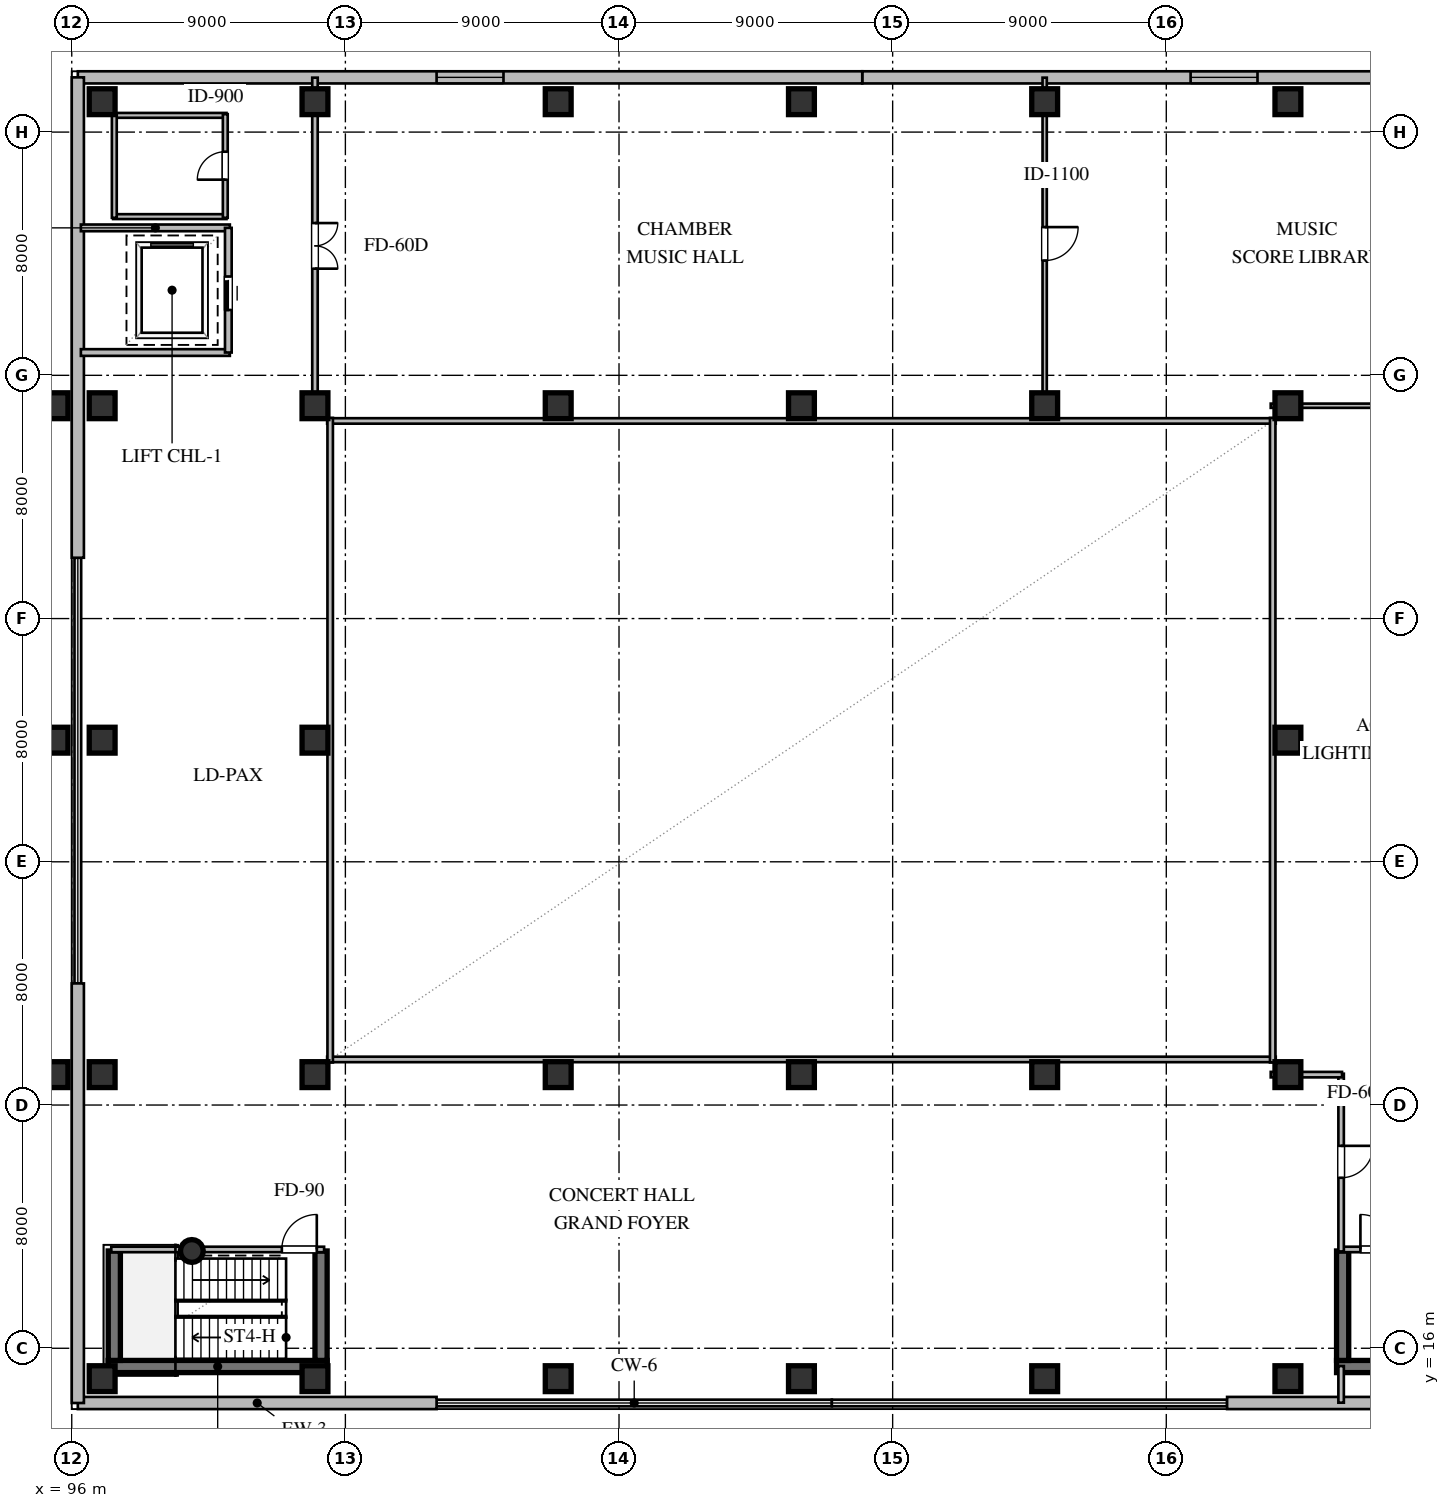
"""IFC4 building model, lengths in metres.
Left out: names, types, materials, properties, quantities, classifications, styles, units other than length and angle.
Written with IfcOpenShell. Run it as: python <this file> out.ifc"""

import sys

from ifc_helpers import new_model, si_unit, direction, frame, frame_2d, origin, origin_2d, place, context, subcontext, project, spatial, rectangle, circle, extrude, element, fill, save


model = new_model("IFC4")
c1 = context("Model", 3, precision=1e-05, world=origin(), true_north=direction((0.0, 1.0)))
c2 = subcontext(c1, "Body", "Model", "MODEL_VIEW")
j1 = project(units=[si_unit("LENGTHUNIT", "METRE"), si_unit("PLANEANGLEUNIT", "RADIAN")], contexts=[c1])
p1 = place(None, origin())
s1 = spatial("IfcSite", under=j1, at=p1, CompositionType="ELEMENT")
p2 = place(p1, origin())
s2 = spatial("IfcBuilding", under=s1, at=p2, CompositionType="ELEMENT")
p3 = place(p2, frame((0.0, 0.0, 9.6)))
s3 = spatial("IfcBuildingStorey", under=s2, at=p3, CompositionType="ELEMENT", Elevation=9.6)
for number, where, z_axis, x_axis in (
    (1, (97.0, 15.0, 0.0), (0.0, 0.0, 1.0), (1.0, 0.0, 0.0)),
    (2, (97.0, 25.0, 0.0), (0.0, 0.0, 1.0), (1.0, 0.0, 0.0)),
    (3, (97.0, 36.0, 0.0), (0.0, 0.0, 1.0), (1.0, 0.0, 0.0)),
    (4, (97.0, 47.0, 0.0), (0.0, 0.0, 1.0), (1.0, 0.0, 0.0)),
    (5, (97.0, 57.0, 0.0), (0.0, 0.0, 1.0), (1.0, 0.0, 0.0)),
    (6, (104.0, 15.0, 0.0), (0.0, 0.0, 1.0), (1.0, 0.0, 0.0)),
    (7, (104.0, 25.0, 0.0), (0.0, 0.0, 1.0), (1.0, 0.0, 0.0)),
    (8, (104.0, 36.0, 0.0), (0.0, 0.0, 1.0), (1.0, 0.0, 0.0)),
    (9, (104.0, 47.0, 0.0), (0.0, 0.0, 1.0), (1.0, 0.0, 0.0)),
    (10, (104.0, 57.0, 0.0), (0.0, 0.0, 1.0), (1.0, 0.0, 0.0)),
    (11, (112.0, 15.0, 0.0), (0.0, 0.0, 1.0), (1.0, 0.0, 0.0)),
    (12, (112.0, 25.0, 0.0), (0.0, 0.0, 1.0), (1.0, 0.0, 0.0)),
    (13, (112.0, 47.0, 0.0), (0.0, 0.0, 1.0), (1.0, 0.0, 0.0)),
    (14, (112.0, 57.0, 0.0), (0.0, 0.0, 1.0), (1.0, 0.0, 0.0)),
    (15, (120.0, 15.0, 0.0), (0.0, 0.0, 1.0), (1.0, 0.0, 0.0)),
    (16, (120.0, 25.0, 0.0), (0.0, 0.0, 1.0), (1.0, 0.0, 0.0)),
    (17, (120.0, 47.0, 0.0), (0.0, 0.0, 1.0), (1.0, 0.0, 0.0)),
    (18, (120.0, 57.0, 0.0), (0.0, 0.0, 1.0), (1.0, 0.0, 0.0)),
    (19, (128.0, 15.0, 0.0), (0.0, 0.0, 1.0), (1.0, 0.0, 0.0)),
    (20, (128.0, 25.0, 0.0), (0.0, 0.0, 1.0), (1.0, 0.0, 0.0)),
    (21, (128.0, 47.0, 0.0), (0.0, 0.0, 1.0), (1.0, 0.0, 0.0)),
    (22, (128.0, 57.0, 0.0), (0.0, 0.0, 1.0), (1.0, 0.0, 0.0)),
    (23, (136.0, 15.0, 0.0), (0.0, 0.0, 1.0), (1.0, 0.0, 0.0)),
    (24, (136.0, 25.0, 0.0), (0.0, 0.0, 1.0), (1.0, 0.0, 0.0)),
    (25, (136.0, 36.0, 0.0), (0.0, 0.0, 1.0), (1.0, 0.0, 0.0)),
    (26, (136.0, 47.0, 0.0), (0.0, 0.0, 1.0), (1.0, 0.0, 0.0)),
    (27, (136.0, 57.0, 0.0), (0.0, 0.0, 1.0), (1.0, 0.0, 0.0)),
):
    element("IfcColumn", number, at=place(p3, frame(where, z_axis=z_axis, x_axis=x_axis)), inside=s3, PredefinedType="COLUMN", context=c2, shape_type="SweptSolid", body=[
        extrude(rectangle(XDim=0.85, YDim=0.85, at=origin_2d()), origin(), (0.0, 0.0, 1.0), 4.8),
    ])
p4 = place(p3, frame((97.2, 15.4, 0.0), z_axis=(0.0, 0.0, 1.0), x_axis=(1.0, 0.0, 0.0)))
e28 = element("IfcWall", 28, at=p4, inside=s3, PredefinedType="SHEAR", context=c2, shape_type="SweptSolid", body=[
    extrude(rectangle(XDim=7.2, YDim=0.4, at=frame_2d((3.6, 0.0))), origin(), (0.0, 0.0, 1.0), 4.52),
])
for number, where, z_axis, x_axis in (
    (29, (97.4, 15.6, 0.0), (0.0, 0.0, 1.0), (0.0, 1.0, 0.0)),
    (30, (104.2, 15.6, 0.0), (0.0, 0.0, 1.0), (0.0, 1.0, 0.0)),
):
    element("IfcWall", number, at=place(p3, frame(where, z_axis=z_axis, x_axis=x_axis)), inside=s3, PredefinedType="SHEAR", context=c2, shape_type="SweptSolid", body=[
        extrude(rectangle(XDim=3.6, YDim=0.4, at=frame_2d((1.8, 0.0))), origin(), (0.0, 0.0, 1.0), 4.52),
    ])
p5 = place(p3, frame((99.95, 19.2, 0.0), z_axis=(0.0, 0.0, 1.0), x_axis=(1.0, 0.0, 0.0)))
e31 = element("IfcColumn", 31, at=p5, inside=s3, PredefinedType="COLUMN", context=c2, shape_type="SweptSolid", body=[
    extrude(circle(Radius=0.375, at=origin_2d()), origin(), (0.0, 0.0, 1.0), 4.8),
])
p6 = place(p3, frame((137.6, 15.4, 0.0), z_axis=(0.0, 0.0, 1.0), x_axis=(1.0, 0.0, 0.0)))
e32 = element("IfcWall", 32, at=p6, inside=s3, PredefinedType="SHEAR", context=c2, shape_type="SweptSolid", body=[
    extrude(rectangle(XDim=7.2, YDim=0.4, at=frame_2d((3.6, 0.0))), origin(), (0.0, 0.0, 1.0), 4.52),
])
p7 = place(p3, frame((137.8, 15.6, 0.0), z_axis=(0.0, 0.0, 1.0), x_axis=(0.0, 1.0, 0.0)))
e33 = element("IfcWall", 33, at=p7, inside=s3, PredefinedType="SHEAR", context=c2, shape_type="SweptSolid", body=[
    extrude(rectangle(XDim=3.6, YDim=0.4, at=frame_2d((1.8, 0.0))), origin(), (0.0, 0.0, 1.0), 4.52),
])
for number, where, z_axis, x_axis in (
    (34, (95.45, 25.0, 0.0), (0.0, 0.0, 1.0), (1.0, 0.0, 0.0)),
    (35, (95.45, 36.0, 0.0), (0.0, 0.0, 1.0), (1.0, 0.0, 0.0)),
    (36, (95.45, 47.0, 0.0), (0.0, 0.0, 1.0), (1.0, 0.0, 0.0)),
):
    element("IfcColumn", number, at=place(p3, frame(where, z_axis=z_axis, x_axis=x_axis)), inside=s3, PredefinedType="COLUMN", context=c2, shape_type="SweptSolid", body=[
        extrude(rectangle(XDim=0.85, YDim=0.85, at=origin_2d()), origin(), (0.0, 0.0, 1.0), 4.8),
    ])
for number, where, z_axis, x_axis in (
    (37, (96.2, 14.2, 0.0), (0.0, 0.0, 1.0), (1.0, 0.0, 0.0)),
    (38, (134.0, 14.2, 0.0), (0.0, 0.0, 1.0), (1.0, 0.0, 0.0)),
):
    element("IfcWall", number, at=place(p3, frame(where, z_axis=z_axis, x_axis=x_axis)), inside=s3, PredefinedType="STANDARD", context=c2, shape_type="SweptSolid", body=[
        extrude(rectangle(XDim=11.8, YDim=0.4, at=frame_2d((5.9, 0.0))), origin(), (0.0, 0.0, 1.0), 4.52),
    ])
p8 = place(p3, frame((145.8, 57.8, 0.0), z_axis=(0.0, 0.0, 1.0), x_axis=(-1.0, 0.0, 0.0)))
e39 = element("IfcWall", 39, at=p8, inside=s3, PredefinedType="STANDARD", context=c2, shape_type="SweptSolid", body=[
    extrude(rectangle(XDim=23.8, YDim=0.4, at=frame_2d((11.9, 0.0))), origin(), (0.0, 0.0, 1.0), 4.52),
])
p9 = place(p8, frame((10.8, 0.0, 1.25)))
e40 = element("IfcOpeningElement", 40, at=p9, cuts=e39, PredefinedType="OPENING", context=c2, shape_type="SweptSolid", body=[
    extrude(rectangle(XDim=2.2, YDim=1.5, at=frame_2d((1.1, 0.75))), frame((0.0, 0.21, 0.0), z_axis=(0.0, -1.0, 0.0), x_axis=(1.0, 0.0, 0.0)), (0.0, 0.0, 1.0), 0.42),
])
p10 = place(p3, frame((122.0, 57.8, 0.0), z_axis=(0.0, 0.0, 1.0), x_axis=(-1.0, 0.0, 0.0)))
e41 = element("IfcWall", 41, at=p10, inside=s3, PredefinedType="STANDARD", context=c2, shape_type="SweptSolid", body=[
    extrude(rectangle(XDim=25.8, YDim=0.4, at=frame_2d((12.9, 0.0))), origin(), (0.0, 0.0, 1.0), 4.52),
])
p11 = place(p10, frame((11.8, 0.0, 1.25)))
e42 = element("IfcOpeningElement", 42, at=p11, cuts=e41, PredefinedType="OPENING", context=c2, shape_type="SweptSolid", body=[
    extrude(rectangle(XDim=2.2, YDim=1.5, at=frame_2d((1.1, 0.75))), frame((0.0, 0.21, 0.0), z_axis=(0.0, -1.0, 0.0), x_axis=(1.0, 0.0, 0.0)), (0.0, 0.0, 1.0), 0.42),
])
p12 = place(p3, frame((96.2, 57.8, 0.0), z_axis=(0.0, 0.0, 1.0), x_axis=(0.0, -1.0, 0.0)))
e43 = element("IfcWall", 43, at=p12, inside=s3, PredefinedType="STANDARD", context=c2, shape_type="SweptSolid", body=[
    extrude(rectangle(XDim=15.8, YDim=0.4, at=frame_2d((7.9, 0.0))), origin(), (0.0, 0.0, 1.0), 4.52),
])
p13 = place(p3, frame((96.2, 28.0, 0.0), z_axis=(0.0, 0.0, 1.0), x_axis=(0.0, -1.0, 0.0)))
e44 = element("IfcWall", 44, at=p13, inside=s3, PredefinedType="STANDARD", context=c2, shape_type="SweptSolid", body=[
    extrude(rectangle(XDim=13.8, YDim=0.4, at=frame_2d((6.9, 0.0))), origin(), (0.0, 0.0, 1.0), 4.52),
])
p14 = place(p3, frame((97.3, 19.25, 0.0), z_axis=(0.0, 0.0, 1.0), x_axis=(1.0, 0.0, 0.0)))
e45 = element("IfcWall", 45, at=p14, inside=s3, PredefinedType="PARTITIONING", context=c2, shape_type="SweptSolid", body=[
    extrude(rectangle(XDim=7.0, YDim=0.18, at=frame_2d((3.5, 0.0))), origin(), (0.0, 0.0, 1.0), 4.52),
])
p15 = place(p14, frame((5.61, 0.0, 0.0)))
e46 = element("IfcOpeningElement", 46, at=p15, cuts=e45, PredefinedType="OPENING", context=c2, shape_type="SweptSolid", body=[
    extrude(rectangle(XDim=1.15, YDim=2.1, at=frame_2d((0.575, 1.05))), frame((0.0, 0.1, 0.0), z_axis=(0.0, -1.0, 0.0), x_axis=(1.0, 0.0, 0.0)), (0.0, 0.0, 1.0), 0.2),
])
p16 = place(p3, frame((137.7, 19.25, 0.0), z_axis=(0.0, 0.0, 1.0), x_axis=(1.0, 0.0, 0.0)))
e47 = element("IfcWall", 47, at=p16, inside=s3, PredefinedType="PARTITIONING", context=c2, shape_type="SweptSolid", body=[
    extrude(rectangle(XDim=7.0, YDim=0.18, at=frame_2d((3.5, 0.0))), origin(), (0.0, 0.0, 1.0), 4.52),
])
p17 = place(p16, frame((0.685, 0.0, 0.0)))
e48 = element("IfcOpeningElement", 48, at=p17, cuts=e47, PredefinedType="OPENING", context=c2, shape_type="SweptSolid", body=[
    extrude(rectangle(XDim=1.15, YDim=2.1, at=frame_2d((0.575, 1.05))), frame((0.0, 0.1, 0.0), z_axis=(0.0, -1.0, 0.0), x_axis=(1.0, 0.0, 0.0)), (0.0, 0.0, 1.0), 0.2),
])
for number, where, z_axis, x_axis in (
    (49, (96.3, 52.85, 0.0), (0.0, 0.0, 1.0), (1.0, 0.0, 0.0)),
    (50, (96.3, 48.75, 0.0), (0.0, 0.0, 1.0), (1.0, 0.0, 0.0)),
):
    element("IfcWall", number, at=place(p3, frame(where, z_axis=z_axis, x_axis=x_axis)), inside=s3, PredefinedType="SOLIDWALL", context=c2, shape_type="SweptSolid", body=[
        extrude(rectangle(XDim=4.9, YDim=0.22, at=frame_2d((2.45, 0.0))), origin(), (0.0, 0.0, 1.0), 4.52),
    ])
p18 = place(p3, frame((101.15, 48.75, 0.0), z_axis=(0.0, 0.0, 1.0), x_axis=(0.0, 1.0, 0.0)))
e51 = element("IfcWall", 51, at=p18, inside=s3, PredefinedType="SOLIDWALL", context=c2, shape_type="SweptSolid", body=[
    extrude(rectangle(XDim=4.1, YDim=0.22, at=frame_2d((2.05, 0.0))), origin(), (0.0, 0.0, 1.0), 4.52),
])
p19 = place(p18, frame((1.4, 0.0, 0.0)))
e52 = element("IfcOpeningElement", 52, at=p19, cuts=e51, PredefinedType="OPENING", context=c2, shape_type="SweptSolid", body=[
    extrude(rectangle(XDim=1.1, YDim=2.1, at=frame_2d((0.55, 1.05))), frame((0.0, 0.12, 0.0), z_axis=(0.0, -1.0, 0.0), x_axis=(1.0, 0.0, 0.0)), (0.0, 0.0, 1.0), 0.24),
])
p20 = place(p3, frame((97.36, 53.22, 0.0), z_axis=(0.0, 0.0, 1.0), x_axis=(1.0, 0.0, 0.0)))
e53 = element("IfcWall", 53, at=p20, inside=s3, PredefinedType="PLUMBINGWALL", context=c2, shape_type="SweptSolid", body=[
    extrude(rectangle(XDim=3.73, YDim=0.16, at=frame_2d((1.865, 0.0))), origin(), (0.0, 0.0, 1.0), 4.52),
])
p21 = place(p3, frame((97.36, 56.55, 0.0), z_axis=(0.0, 0.0, 1.0), x_axis=(1.0, 0.0, 0.0)))
e54 = element("IfcWall", 54, at=p21, inside=s3, PredefinedType="PLUMBINGWALL", context=c2, shape_type="SweptSolid", body=[
    extrude(rectangle(XDim=3.73, YDim=0.16, at=frame_2d((1.865, 0.0))), origin(), (0.0, 0.0, 1.0), 3.899),
])
p22 = place(p3, frame((97.4, 53.18, 0.0), z_axis=(0.0, 0.0, 1.0), x_axis=(0.0, 1.0, 0.0)))
e55 = element("IfcWall", 55, at=p22, inside=s3, PredefinedType="PLUMBINGWALL", context=c2, shape_type="SweptSolid", body=[
    extrude(rectangle(XDim=3.41, YDim=0.16, at=frame_2d((1.705, 0.0))), origin(), (0.0, 0.0, 1.0), 4.093),
])
p23 = place(p3, frame((101.05, 53.18, 0.0), z_axis=(0.0, 0.0, 1.0), x_axis=(0.0, 1.0, 0.0)))
e56 = element("IfcWall", 56, at=p23, inside=s3, PredefinedType="PLUMBINGWALL", context=c2, shape_type="SweptSolid", body=[
    extrude(rectangle(XDim=3.41, YDim=0.16, at=frame_2d((1.705, 0.0))), origin(), (0.0, 0.0, 1.0), 4.52),
])
p24 = place(p23, frame((1.255, 0.0, 0.0)))
e57 = element("IfcOpeningElement", 57, at=p24, cuts=e56, PredefinedType="OPENING", context=c2, shape_type="SweptSolid", body=[
    extrude(rectangle(XDim=0.92, YDim=2.1, at=frame_2d((0.46, 1.05))), frame((0.0, 0.09, 0.0), z_axis=(0.0, -1.0, 0.0), x_axis=(1.0, 0.0, 0.0)), (0.0, 0.0, 1.0), 0.18),
])
for number, where, z_axis, x_axis in (
    (58, (104.4, 25.5, 0.0), (0.0, 0.0, 1.0), (1.0, 0.0, 0.0)),
    (59, (104.4, 46.5, 0.0), (0.0, 0.0, 1.0), (1.0, 0.0, 0.0)),
):
    element("IfcWall", number, at=place(p3, frame(where, z_axis=z_axis, x_axis=x_axis)), inside=s3, PredefinedType="PARTITIONING", context=c2, shape_type="SweptSolid", body=[
        extrude(rectangle(XDim=31.2, YDim=0.18, at=frame_2d((15.6, 0.0))), origin(), (0.0, 0.0, 1.0), 3.899),
    ])
for number, where, z_axis, x_axis in (
    (60, (104.5, 25.4, 0.0), (0.0, 0.0, 1.0), (0.0, 1.0, 0.0)),
    (61, (135.5, 25.4, 0.0), (0.0, 0.0, 1.0), (0.0, 1.0, 0.0)),
):
    element("IfcWall", number, at=place(p3, frame(where, z_axis=z_axis, x_axis=x_axis)), inside=s3, PredefinedType="PARTITIONING", context=c2, shape_type="SweptSolid", body=[
        extrude(rectangle(XDim=21.2, YDim=0.18, at=frame_2d((10.6, 0.0))), origin(), (0.0, 0.0, 1.0), 4.093),
    ])
p25 = place(p3, frame((104.0, 57.79, 0.0), z_axis=(0.0, 0.0, 1.0), x_axis=(0.0, -1.0, 0.0)))
e62 = element("IfcWall", 62, at=p25, inside=s3, PredefinedType="PARTITIONING", context=c2, shape_type="SweptSolid", body=[
    extrude(rectangle(XDim=10.855, YDim=0.18, at=frame_2d((5.427, 0.0))), origin(), (0.0, 0.0, 1.0), 4.093),
])
p26 = place(p25, frame((4.782, 0.0, 0.0)))
e63 = element("IfcOpeningElement", 63, at=p26, cuts=e62, PredefinedType="OPENING", context=c2, shape_type="SweptSolid", body=[
    extrude(rectangle(XDim=1.5, YDim=2.15, at=frame_2d((0.75, 1.075))), frame((0.0, 0.1, 0.0), z_axis=(0.0, -1.0, 0.0), x_axis=(1.0, 0.0, 0.0)), (0.0, 0.0, 1.0), 0.2),
])
p27 = place(p3, frame((137.75, 25.03, 0.0), z_axis=(0.0, 0.0, 1.0), x_axis=(0.0, -1.0, 0.0)))
e64 = element("IfcWall", 64, at=p27, inside=s3, PredefinedType="PARTITIONING", context=c2, shape_type="SweptSolid", body=[
    extrude(rectangle(XDim=5.845, YDim=0.18, at=frame_2d((2.922, 0.0))), origin(), (0.0, 0.0, 1.0), 4.52),
])
p28 = place(p27, frame((2.372, 0.0, 0.0)))
e65 = element("IfcOpeningElement", 65, at=p28, cuts=e64, PredefinedType="OPENING", context=c2, shape_type="SweptSolid", body=[
    extrude(rectangle(XDim=1.05, YDim=2.1, at=frame_2d((0.525, 1.05))), frame((0.0, 0.1, 0.0), z_axis=(0.0, -1.0, 0.0), x_axis=(1.0, 0.0, 0.0)), (0.0, 0.0, 1.0), 0.2),
])
p29 = place(p3, frame((135.435, 25.0, 0.0), z_axis=(0.0, 0.0, 1.0), x_axis=(1.0, 0.0, 0.0)))
e66 = element("IfcWall", 66, at=p29, inside=s3, PredefinedType="PARTITIONING", context=c2, shape_type="SweptSolid", body=[
    extrude(rectangle(XDim=2.345, YDim=0.18, at=frame_2d((1.172, 0.0))), origin(), (0.0, 0.0, 1.0), 3.899),
])
p30 = place(p3, frame((137.75, 15.415, 0.0), z_axis=(0.0, 0.0, 1.0), x_axis=(0.0, -1.0, 0.0)))
e67 = element("IfcWall", 67, at=p30, inside=s3, PredefinedType="PARTITIONING", context=c2, shape_type="SweptSolid", body=[
    extrude(rectangle(XDim=1.205, YDim=0.18, at=frame_2d((0.603, 0.0))), origin(), (0.0, 0.0, 1.0), 4.52),
])
p31 = place(p3, frame((128.0, 57.79, 0.0), z_axis=(0.0, 0.0, 1.0), x_axis=(0.0, -1.0, 0.0)))
e68 = element("IfcWall", 68, at=p31, inside=s3, PredefinedType="PARTITIONING", context=c2, shape_type="SweptSolid", body=[
    extrude(rectangle(XDim=10.82, YDim=0.14, at=frame_2d((5.41, 0.0))), origin(), (0.0, 0.0, 1.0), 4.093),
])
p32 = place(p31, frame((4.915, 0.0, 0.0)))
e69 = element("IfcOpeningElement", 69, at=p32, cuts=e68, PredefinedType="OPENING", context=c2, shape_type="SweptSolid", body=[
    extrude(rectangle(XDim=1.1, YDim=2.1, at=frame_2d((0.55, 1.05))), frame((0.0, 0.08, 0.0), z_axis=(0.0, -1.0, 0.0), x_axis=(1.0, 0.0, 0.0)), (0.0, 0.0, 1.0), 0.16),
])
p33 = place(p3, frame((144.38, 47.0, 0.0), z_axis=(0.0, 0.0, 1.0), x_axis=(-1.0, 0.0, 0.0)))
e70 = element("IfcWall", 70, at=p33, inside=s3, PredefinedType="PARTITIONING", context=c2, shape_type="SweptSolid", body=[
    extrude(rectangle(XDim=8.945, YDim=0.14, at=frame_2d((4.472, 0.0))), origin(), (0.0, 0.0, 1.0), 3.899),
])
p34 = place(p9, origin())
e71 = element("IfcWindow", 71, at=p34, inside=s3, PartitioningType="SINGLE_PANEL", PredefinedType="WINDOW", context=c2, shape_type="SweptSolid", body=[
    extrude(rectangle(XDim=2.2, YDim=1.5, at=frame_2d((1.1, 0.75))), frame((0.0, 0.03, 0.0), z_axis=(0.0, -1.0, 0.0), x_axis=(1.0, 0.0, 0.0)), (0.0, 0.0, 1.0), 0.06),
])
fill(e40, e71)
p35 = place(p11, origin())
e72 = element("IfcWindow", 72, at=p35, inside=s3, PartitioningType="SINGLE_PANEL", PredefinedType="WINDOW", context=c2, shape_type="SweptSolid", body=[
    extrude(rectangle(XDim=2.2, YDim=1.5, at=frame_2d((1.1, 0.75))), frame((0.0, 0.03, 0.0), z_axis=(0.0, -1.0, 0.0), x_axis=(1.0, 0.0, 0.0)), (0.0, 0.0, 1.0), 0.06),
])
fill(e42, e72)
p36 = place(p15, origin())
e73 = element("IfcDoor", 73, at=p36, inside=s3, OperationType="SINGLE_SWING_RIGHT", PredefinedType="DOOR", context=c2, shape_type="SweptSolid", body=[
    extrude(rectangle(XDim=1.15, YDim=2.1, at=frame_2d((0.575, 1.05))), frame((0.0, 0.025, 0.0), z_axis=(0.0, -1.0, 0.0), x_axis=(1.0, 0.0, 0.0)), (0.0, 0.0, 1.0), 0.05),
])
fill(e46, e73)
p37 = place(p17, origin())
e74 = element("IfcDoor", 74, at=p37, inside=s3, OperationType="SINGLE_SWING_LEFT", PredefinedType="DOOR", context=c2, shape_type="SweptSolid", body=[
    extrude(rectangle(XDim=1.15, YDim=2.1, at=frame_2d((0.575, 1.05))), frame((0.0, 0.025, 0.0), z_axis=(0.0, -1.0, 0.0), x_axis=(1.0, 0.0, 0.0)), (0.0, 0.0, 1.0), 0.05),
])
fill(e48, e74)
p38 = place(p19, origin())
e75 = element("IfcDoor", 75, at=p38, inside=s3, OperationType="SLIDING_TO_LEFT", PredefinedType="DOOR", context=c2, shape_type="SweptSolid", body=[
    extrude(rectangle(XDim=1.1, YDim=2.1, at=frame_2d((0.55, 1.05))), frame((0.0, 0.025, 0.0), z_axis=(0.0, -1.0, 0.0), x_axis=(1.0, 0.0, 0.0)), (0.0, 0.0, 1.0), 0.05),
])
fill(e52, e75)
p39 = place(p24, origin())
e76 = element("IfcDoor", 76, at=p39, inside=s3, OperationType="SINGLE_SWING_LEFT", PredefinedType="DOOR", context=c2, shape_type="SweptSolid", body=[
    extrude(rectangle(XDim=0.92, YDim=2.1, at=frame_2d((0.46, 1.05))), frame((0.0, 0.025, 0.0), z_axis=(0.0, -1.0, 0.0), x_axis=(1.0, 0.0, 0.0)), (0.0, 0.0, 1.0), 0.05),
])
fill(e57, e76)
p40 = place(p26, origin())
e77 = element("IfcDoor", 77, at=p40, inside=s3, OperationType="DOUBLE_DOOR_SINGLE_SWING", PredefinedType="DOOR", context=c2, shape_type="SweptSolid", body=[
    extrude(rectangle(XDim=1.5, YDim=2.15, at=frame_2d((0.75, 1.075))), frame((0.0, 0.025, 0.0), z_axis=(0.0, -1.0, 0.0), x_axis=(1.0, 0.0, 0.0)), (0.0, 0.0, 1.0), 0.05),
])
fill(e63, e77)
p41 = place(p28, origin())
e78 = element("IfcDoor", 78, at=p41, inside=s3, OperationType="SINGLE_SWING_LEFT", PredefinedType="DOOR", context=c2, shape_type="SweptSolid", body=[
    extrude(rectangle(XDim=1.05, YDim=2.1, at=frame_2d((0.525, 1.05))), frame((0.0, 0.025, 0.0), z_axis=(0.0, -1.0, 0.0), x_axis=(1.0, 0.0, 0.0)), (0.0, 0.0, 1.0), 0.05),
])
fill(e65, e78)
p42 = place(p32, origin())
e79 = element("IfcDoor", 79, at=p42, inside=s3, OperationType="SINGLE_SWING_LEFT", PredefinedType="DOOR", context=c2, shape_type="SweptSolid", body=[
    extrude(rectangle(XDim=1.1, YDim=2.1, at=frame_2d((0.55, 1.05))), frame((0.0, 0.025, 0.0), z_axis=(0.0, -1.0, 0.0), x_axis=(1.0, 0.0, 0.0)), (0.0, 0.0, 1.0), 0.05),
])
fill(e69, e79)
save(model, sys.argv[1])
